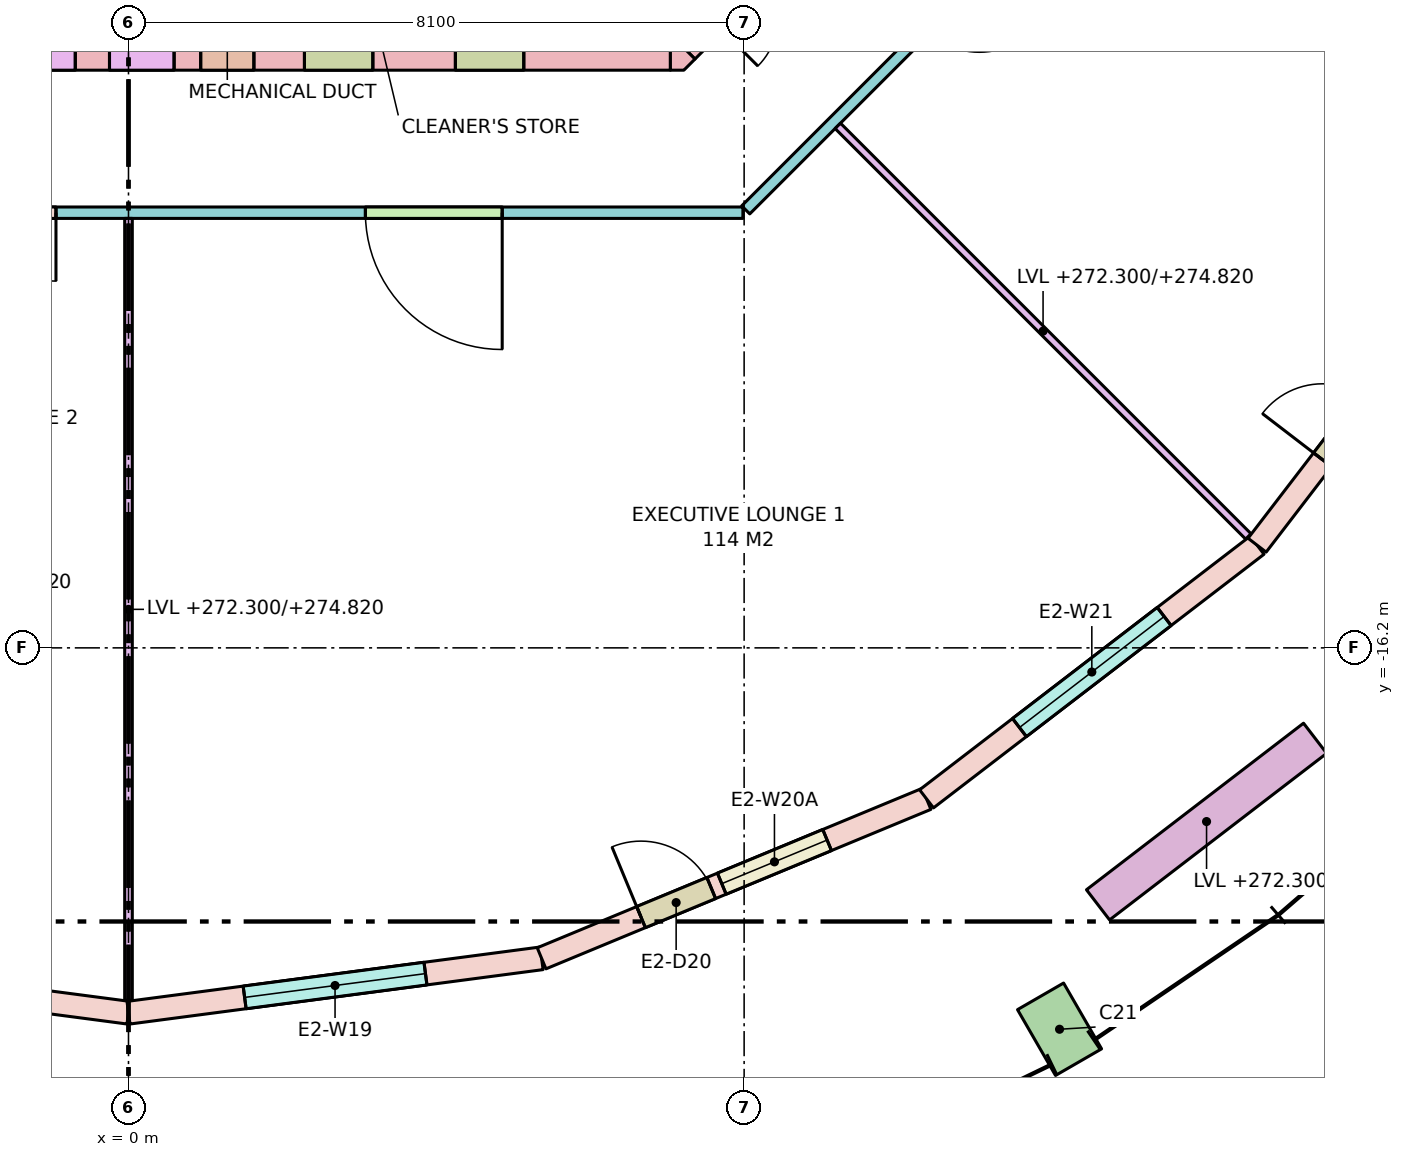
"""IFC4 building model, lengths in metres.
Left out: names, types, materials, properties, quantities, classifications, styles, units other than length and angle.
Written with IfcOpenShell. Run it as: python <this file> out.ifc"""

import sys

from ifc_helpers import new_model, si_unit, direction, frame, frame_2d, origin, origin_2d, place, context, subcontext, project, spatial, polyline, rectangle, outline, extrude, element, fill, save


model = new_model("IFC4")
c1 = context("Model", 3, precision=1e-05, world=origin(), true_north=direction((0.0, 1.0)))
c2 = subcontext(c1, "Body", "Model", "MODEL_VIEW")
j1 = project(units=[si_unit("LENGTHUNIT", "METRE"), si_unit("PLANEANGLEUNIT", "RADIAN")], contexts=[c1])
p1 = place(None, origin())
s1 = spatial("IfcSite", under=j1, at=p1, CompositionType="ELEMENT")
p2 = place(p1, origin())
s2 = spatial("IfcBuilding", under=s1, at=p2, CompositionType="ELEMENT")
p3 = place(p2, frame((0.0, 0.0, 272.3)))
s3 = spatial("IfcBuildingStorey", under=s2, at=p3, CompositionType="ELEMENT", Elevation=272.3)
p4 = place(p3, frame((12.25, -21.218, 0.0), z_axis=(0.0, 0.0, 1.0), x_axis=(0.866025403784, 0.5, 0.0)))
e1 = element("IfcColumn", 1, at=p4, inside=s3, PredefinedType="COLUMN", context=c2, shape_type="SweptSolid", body=[
    extrude(rectangle(XDim=0.7, YDim=1.0, at=origin_2d()), origin(), (0.0, 0.0, 1.0), 3.7),
])
p5 = place(p3, frame((-7.13, -8.35, -0.28), z_axis=(0.0, 0.0, 1.0), x_axis=(1.0, 0.0, 0.0)))
e2 = element("IfcWall", 2, at=p5, inside=s3, PredefinedType="SHEAR", context=c2, shape_type="SweptSolid", body=[
    extrude(rectangle(XDim=14.26, YDim=0.5, at=frame_2d((7.13, 0.0))), origin(), (0.0, 0.0, 1.0), 3.7),
])
p6 = place(p5, frame((8.08, 0.0, 0.28)))
e3 = element("IfcOpeningElement", 3, at=p6, cuts=e2, PredefinedType="OPENING", context=c2, shape_type="SweptSolid", body=[
    extrude(rectangle(XDim=0.7, YDim=2.1, at=frame_2d((0.35, 1.05))), frame((0.0, 0.26, 0.0), z_axis=(0.0, -1.0, 0.0), x_axis=(1.0, 0.0, 0.0)), (0.0, 0.0, 1.0), 0.52),
])
p7 = place(p5, frame((5.58, 0.0, 0.28)))
e4 = element("IfcOpeningElement", 4, at=p7, cuts=e2, PredefinedType="OPENING", context=c2, shape_type="SweptSolid", body=[
    extrude(rectangle(XDim=0.85, YDim=2.1, at=frame_2d((0.425, 1.05))), frame((0.0, 0.26, 0.0), z_axis=(0.0, -1.0, 0.0), x_axis=(1.0, 0.0, 0.0)), (0.0, 0.0, 1.0), 0.52),
])
p8 = place(p5, frame((6.88, 0.0, 0.28)))
e5 = element("IfcOpeningElement", 5, at=p8, cuts=e2, PredefinedType="OPENING", context=c2, shape_type="SweptSolid", body=[
    extrude(rectangle(XDim=0.85, YDim=2.1, at=frame_2d((0.425, 1.05))), frame((0.0, 0.26, 0.0), z_axis=(0.0, -1.0, 0.0), x_axis=(1.0, 0.0, 0.0)), (0.0, 0.0, 1.0), 0.52),
])
p9 = place(p5, frame((9.445, 0.0, 0.28)))
e6 = element("IfcOpeningElement", 6, at=p9, cuts=e2, PredefinedType="OPENING", context=c2, shape_type="SweptSolid", body=[
    extrude(rectangle(XDim=0.9, YDim=2.1, at=frame_2d((0.45, 1.05))), frame((0.0, 0.26, 0.0), z_axis=(0.0, -1.0, 0.0), x_axis=(1.0, 0.0, 0.0)), (0.0, 0.0, 1.0), 0.52),
])
p10 = place(p5, frame((11.431, 0.0, 0.28)))
e7 = element("IfcOpeningElement", 7, at=p10, cuts=e2, PredefinedType="OPENING", context=c2, shape_type="SweptSolid", body=[
    extrude(rectangle(XDim=0.9, YDim=2.1, at=frame_2d((0.45, 1.05))), frame((0.0, 0.26, 0.0), z_axis=(0.0, -1.0, 0.0), x_axis=(1.0, 0.0, 0.0)), (0.0, 0.0, 1.0), 0.52),
])
p11 = place(p3, frame((10.277, -5.277, -0.28), z_axis=(0.0, 0.0, 1.0), x_axis=(-0.707106781187, -0.707106781187, 0.0)))
e8 = element("IfcWall", 8, at=p11, inside=s3, PredefinedType="SHEAR", context=c2, shape_type="SweptSolid", body=[
    extrude(rectangle(XDim=4.243, YDim=0.5, at=frame_2d((2.121, 0.0))), origin(), (0.0, 0.0, 1.0), 3.7),
])
p12 = place(p11, frame((2.823, 0.0, 0.28)))
e9 = element("IfcOpeningElement", 9, at=p12, cuts=e8, PredefinedType="OPENING", context=c2, shape_type="SweptSolid", body=[
    extrude(rectangle(XDim=0.9, YDim=2.1, at=frame_2d((0.45, 1.05))), frame((0.0, 0.26, 0.0), z_axis=(0.0, -1.0, 0.0), x_axis=(1.0, 0.0, 0.0)), (0.0, 0.0, 1.0), 0.52),
])
p13 = place(p11, frame((0.52, 0.0, 0.28)))
e10 = element("IfcOpeningElement", 10, at=p13, cuts=e8, PredefinedType="OPENING", context=c2, shape_type="SweptSolid", body=[
    extrude(rectangle(XDim=0.9, YDim=2.1, at=frame_2d((0.45, 1.05))), frame((0.0, 0.26, 0.0), z_axis=(0.0, -1.0, 0.0), x_axis=(1.0, 0.0, 0.0)), (0.0, 0.0, 1.0), 0.52),
])
p14 = place(p3, frame((0.0, 0.0, -0.28)))
e11 = element("IfcWall", 11, at=p14, inside=s3, PredefinedType="SHEAR", context=c2, shape_type="SweptSolid", body=[
    extrude(outline(polyline([(7.307, -8.6), (7.13, -8.6), (7.13, -8.13), (7.454, -8.454), (7.307, -8.6)])), origin(), (0.0, 0.0, 1.0), 3.7),
])
p15 = place(p3, frame((-5.435, -20.284, 0.0), z_axis=(0.0, 0.0, 1.0), x_axis=(0.991444743541, -0.130527087244, 0.0)))
e12 = element("IfcWall", 12, at=p15, inside=s3, PredefinedType="STANDARD", context=c2, shape_type="SweptSolid", body=[
    extrude(rectangle(XDim=5.482, YDim=0.3, at=frame_2d((2.741, 0.0))), origin(), (0.0, 0.0, 1.0), 3.42),
])
p16 = place(p15, frame((1.416, 0.0, 0.0)))
e13 = element("IfcOpeningElement", 13, at=p16, cuts=e12, PredefinedType="OPENING", context=c2, shape_type="SweptSolid", body=[
    extrude(rectangle(XDim=1.0, YDim=2.4, at=frame_2d((0.5, 1.2))), frame((0.0, 0.16, 0.0), z_axis=(0.0, -1.0, 0.0), x_axis=(1.0, 0.0, 0.0)), (0.0, 0.0, 1.0), 0.32),
])
p17 = place(p15, frame((2.566, 0.0, 0.8)))
e14 = element("IfcOpeningElement", 14, at=p17, cuts=e12, PredefinedType="OPENING", context=c2, shape_type="SweptSolid", body=[
    extrude(rectangle(XDim=1.5, YDim=2.4, at=frame_2d((0.75, 1.2))), frame((0.0, 0.16, 0.0), z_axis=(0.0, -1.0, 0.0), x_axis=(1.0, 0.0, 0.0)), (0.0, 0.0, 1.0), 0.32),
])
p18 = place(p3, frame((0.0, -21.0, 0.0), z_axis=(0.0, 0.0, 1.0), x_axis=(0.991444743541, 0.130527087244, 0.0)))
e15 = element("IfcWall", 15, at=p18, inside=s3, PredefinedType="STANDARD", context=c2, shape_type="SweptSolid", body=[
    extrude(rectangle(XDim=5.482, YDim=0.3, at=frame_2d((2.741, 0.0))), origin(), (0.0, 0.0, 1.0), 3.42),
])
p19 = place(p18, frame((1.541, 0.0, 0.8)))
e16 = element("IfcOpeningElement", 16, at=p19, cuts=e15, PredefinedType="OPENING", context=c2, shape_type="SweptSolid", body=[
    extrude(rectangle(XDim=2.4, YDim=2.4, at=frame_2d((1.2, 1.2))), frame((0.0, 0.16, 0.0), z_axis=(0.0, -1.0, 0.0), x_axis=(1.0, 0.0, 0.0)), (0.0, 0.0, 1.0), 0.32),
])
p20 = place(p3, frame((5.435, -20.284, 0.0), z_axis=(0.0, 0.0, 1.0), x_axis=(0.923877333662, 0.382688740813, 0.0)))
e17 = element("IfcWall", 17, at=p20, inside=s3, PredefinedType="STANDARD", context=c2, shape_type="SweptSolid", body=[
    extrude(rectangle(XDim=5.482, YDim=0.3, at=frame_2d((2.741, 0.0))), origin(), (0.0, 0.0, 1.0), 3.42),
])
p21 = place(p20, frame((1.416, 0.0, 0.0)))
e18 = element("IfcOpeningElement", 18, at=p21, cuts=e17, PredefinedType="OPENING", context=c2, shape_type="SweptSolid", body=[
    extrude(rectangle(XDim=1.0, YDim=2.4, at=frame_2d((0.5, 1.2))), frame((0.0, 0.16, 0.0), z_axis=(0.0, -1.0, 0.0), x_axis=(1.0, 0.0, 0.0)), (0.0, 0.0, 1.0), 0.32),
])
p22 = place(p20, frame((2.566, 0.0, 0.8)))
e19 = element("IfcOpeningElement", 19, at=p22, cuts=e17, PredefinedType="OPENING", context=c2, shape_type="SweptSolid", body=[
    extrude(rectangle(XDim=1.5, YDim=2.4, at=frame_2d((0.75, 1.2))), frame((0.0, 0.16, 0.0), z_axis=(0.0, -1.0, 0.0), x_axis=(1.0, 0.0, 0.0)), (0.0, 0.0, 1.0), 0.32),
])
p23 = place(p3, frame((10.5, -18.187, 0.0), z_axis=(0.0, 0.0, 1.0), x_axis=(0.793335336593, 0.608784891166, 0.0)))
e20 = element("IfcWall", 20, at=p23, inside=s3, PredefinedType="STANDARD", context=c2, shape_type="SweptSolid", body=[
    extrude(rectangle(XDim=5.482, YDim=0.3, at=frame_2d((2.741, 0.0))), origin(), (0.0, 0.0, 1.0), 3.42),
])
p24 = place(p23, frame((1.541, 0.0, 0.8)))
e21 = element("IfcOpeningElement", 21, at=p24, cuts=e20, PredefinedType="OPENING", context=c2, shape_type="SweptSolid", body=[
    extrude(rectangle(XDim=2.4, YDim=2.4, at=frame_2d((1.2, 1.2))), frame((0.0, 0.16, 0.0), z_axis=(0.0, -1.0, 0.0), x_axis=(1.0, 0.0, 0.0)), (0.0, 0.0, 1.0), 0.32),
])
p25 = place(p3, frame((14.849, -14.849, 0.0), z_axis=(0.0, 0.0, 1.0), x_axis=(0.608784891166, 0.793335336593, 0.0)))
e22 = element("IfcWall", 22, at=p25, inside=s3, PredefinedType="STANDARD", context=c2, shape_type="SweptSolid", body=[
    extrude(rectangle(XDim=5.482, YDim=0.3, at=frame_2d((2.741, 0.0))), origin(), (0.0, 0.0, 1.0), 3.42),
])
p26 = place(p25, frame((1.416, 0.0, 0.0)))
e23 = element("IfcOpeningElement", 23, at=p26, cuts=e22, PredefinedType="OPENING", context=c2, shape_type="SweptSolid", body=[
    extrude(rectangle(XDim=1.0, YDim=2.4, at=frame_2d((0.5, 1.2))), frame((0.0, 0.16, 0.0), z_axis=(0.0, -1.0, 0.0), x_axis=(1.0, 0.0, 0.0)), (0.0, 0.0, 1.0), 0.32),
])
p27 = place(p25, frame((2.566, 0.0, 0.8)))
e24 = element("IfcOpeningElement", 24, at=p27, cuts=e22, PredefinedType="OPENING", context=c2, shape_type="SweptSolid", body=[
    extrude(rectangle(XDim=1.5, YDim=2.4, at=frame_2d((0.75, 1.2))), frame((0.0, 0.16, 0.0), z_axis=(0.0, -1.0, 0.0), x_axis=(1.0, 0.0, 0.0)), (0.0, 0.0, 1.0), 0.32),
])
p28 = place(p3, frame((12.756, -19.581, 0.0), z_axis=(0.0, 0.0, 1.0), x_axis=(0.793384730612, 0.608720518162, 0.0)))
e25 = element("IfcWall", 25, at=p28, inside=s3, PredefinedType="PARAPET", context=c2, shape_type="SweptSolid", body=[
    extrude(rectangle(XDim=3.6, YDim=0.5, at=frame_2d((1.8, 0.0))), origin(), (0.0, 0.0, 1.0), 0.9),
])
p29 = place(p3, frame((12.438, -6.121, 0.0), z_axis=(0.0, 0.0, 1.0), x_axis=(-0.707106781187, -0.707106781187, 0.0)))
e26 = element("IfcWall", 26, at=p29, inside=s3, PredefinedType="PARTITIONING", context=c2, shape_type="SweptSolid", body=[
    extrude(rectangle(XDim=6.105, YDim=0.15, at=frame_2d((3.053, 0.0))), origin(), (0.0, 0.0, 1.0), 2.52),
])
p30 = place(p29, frame((1.758, 0.0, 0.0)))
e27 = element("IfcOpeningElement", 27, at=p30, cuts=e26, PredefinedType="OPENING", context=c2, shape_type="SweptSolid", body=[
    extrude(rectangle(XDim=1.0, YDim=2.1, at=frame_2d((0.5, 1.05))), frame((0.0, 0.085, 0.0), z_axis=(0.0, -1.0, 0.0), x_axis=(1.0, 0.0, 0.0)), (0.0, 0.0, 1.0), 0.17),
])
p31 = place(p3, frame((8.084, -10.475, 0.0), z_axis=(0.0, 0.0, 1.0), x_axis=(-1.0, 0.0, 0.0)))
e28 = element("IfcWall", 28, at=p31, inside=s3, PredefinedType="PARTITIONING", context=c2, shape_type="SweptSolid", body=[
    extrude(rectangle(XDim=16.167, YDim=0.15, at=frame_2d((8.084, 0.0))), origin(), (0.0, 0.0, 1.0), 2.52),
])
p32 = place(p31, frame((12.015, 0.0, 0.0)))
e29 = element("IfcOpeningElement", 29, at=p32, cuts=e28, PredefinedType="OPENING", context=c2, shape_type="SweptSolid", body=[
    extrude(rectangle(XDim=1.0, YDim=2.1, at=frame_2d((0.5, 1.05))), frame((0.0, 0.085, 0.0), z_axis=(0.0, -1.0, 0.0), x_axis=(1.0, 0.0, 0.0)), (0.0, 0.0, 1.0), 0.17),
])
p33 = place(p31, frame((9.038, 0.0, 0.0)))
e30 = element("IfcOpeningElement", 30, at=p33, cuts=e28, PredefinedType="OPENING", context=c2, shape_type="SweptSolid", body=[
    extrude(rectangle(XDim=0.9, YDim=2.1, at=frame_2d((0.45, 1.05))), frame((0.0, 0.085, 0.0), z_axis=(0.0, -1.0, 0.0), x_axis=(1.0, 0.0, 0.0)), (0.0, 0.0, 1.0), 0.17),
])
p34 = place(p31, frame((3.167, 0.0, 0.0)))
e31 = element("IfcOpeningElement", 31, at=p34, cuts=e28, PredefinedType="OPENING", context=c2, shape_type="SweptSolid", body=[
    extrude(rectangle(XDim=1.8, YDim=2.1, at=frame_2d((0.9, 1.05))), frame((0.0, 0.085, 0.0), z_axis=(0.0, -1.0, 0.0), x_axis=(1.0, 0.0, 0.0)), (0.0, 0.0, 1.0), 0.17),
])
p35 = place(p3, frame((0.0, -10.55, 0.0), z_axis=(0.0, 0.0, 1.0), x_axis=(0.0, -1.0, 0.0)))
e32 = element("IfcWall", 32, at=p35, inside=s3, PredefinedType="PARTITIONING", context=c2, shape_type="SweptSolid", body=[
    extrude(rectangle(XDim=10.287, YDim=0.1, at=frame_2d((5.143, 0.0))), origin(), (0.0, 0.0, 1.0), 2.52),
])
p36 = place(p3, frame((9.333, -9.333, 0.0), z_axis=(0.0, 0.0, 1.0), x_axis=(0.707106781187, -0.707106781187, 0.0)))
e33 = element("IfcWall", 33, at=p36, inside=s3, PredefinedType="PARTITIONING", context=c2, shape_type="SweptSolid", body=[
    extrude(rectangle(XDim=7.639, YDim=0.1, at=frame_2d((3.819, 0.0))), origin(), (0.0, 0.0, 1.0), 2.52),
])
p37 = place(p19, origin())
e34 = element("IfcWindow", 34, at=p37, inside=s3, PartitioningType="SINGLE_PANEL", PredefinedType="WINDOW", context=c2, shape_type="SweptSolid", body=[
    extrude(rectangle(XDim=2.4, YDim=2.4, at=frame_2d((1.2, 1.2))), frame((0.0, 0.03, 0.0), z_axis=(0.0, -1.0, 0.0), x_axis=(1.0, 0.0, 0.0)), (0.0, 0.0, 1.0), 0.06),
])
fill(e16, e34)
p38 = place(p21, origin())
e35 = element("IfcDoor", 35, at=p38, inside=s3, OperationType="SINGLE_SWING_LEFT", PredefinedType="DOOR", context=c2, shape_type="SweptSolid", body=[
    extrude(rectangle(XDim=1.0, YDim=2.4, at=frame_2d((0.5, 1.2))), frame((0.0, 0.025, 0.0), z_axis=(0.0, -1.0, 0.0), x_axis=(1.0, 0.0, 0.0)), (0.0, 0.0, 1.0), 0.05),
])
fill(e18, e35)
p39 = place(p22, origin())
e36 = element("IfcWindow", 36, at=p39, inside=s3, PartitioningType="SINGLE_PANEL", PredefinedType="WINDOW", context=c2, shape_type="SweptSolid", body=[
    extrude(rectangle(XDim=1.5, YDim=2.4, at=frame_2d((0.75, 1.2))), frame((0.0, 0.03, 0.0), z_axis=(0.0, -1.0, 0.0), x_axis=(1.0, 0.0, 0.0)), (0.0, 0.0, 1.0), 0.06),
])
fill(e19, e36)
p40 = place(p24, origin())
e37 = element("IfcWindow", 37, at=p40, inside=s3, PartitioningType="SINGLE_PANEL", PredefinedType="WINDOW", context=c2, shape_type="SweptSolid", body=[
    extrude(rectangle(XDim=2.4, YDim=2.4, at=frame_2d((1.2, 1.2))), frame((0.0, 0.03, 0.0), z_axis=(0.0, -1.0, 0.0), x_axis=(1.0, 0.0, 0.0)), (0.0, 0.0, 1.0), 0.06),
])
fill(e21, e37)
p41 = place(p26, origin())
e38 = element("IfcDoor", 38, at=p41, inside=s3, OperationType="SINGLE_SWING_LEFT", PredefinedType="DOOR", context=c2, shape_type="SweptSolid", body=[
    extrude(rectangle(XDim=1.0, YDim=2.4, at=frame_2d((0.5, 1.2))), frame((0.0, 0.025, 0.0), z_axis=(0.0, -1.0, 0.0), x_axis=(1.0, 0.0, 0.0)), (0.0, 0.0, 1.0), 0.05),
])
fill(e23, e38)
p42 = place(p6, origin())
e39 = element("IfcDoor", 39, at=p42, inside=s3, OperationType="SINGLE_SWING_RIGHT", PredefinedType="DOOR", context=c2, shape_type="SweptSolid", body=[
    extrude(rectangle(XDim=0.7, YDim=2.1, at=frame_2d((0.35, 1.05))), frame((0.0, 0.025, 0.0), z_axis=(0.0, -1.0, 0.0), x_axis=(1.0, 0.0, 0.0)), (0.0, 0.0, 1.0), 0.05),
])
fill(e3, e39)
p43 = place(p7, origin())
e40 = element("IfcDoor", 40, at=p43, inside=s3, OperationType="SINGLE_SWING_RIGHT", PredefinedType="DOOR", context=c2, shape_type="SweptSolid", body=[
    extrude(rectangle(XDim=0.85, YDim=2.1, at=frame_2d((0.425, 1.05))), frame((0.0, 0.025, 0.0), z_axis=(0.0, -1.0, 0.0), x_axis=(1.0, 0.0, 0.0)), (0.0, 0.0, 1.0), 0.05),
])
fill(e4, e40)
p44 = place(p8, origin())
e41 = element("IfcDoor", 41, at=p44, inside=s3, OperationType="SINGLE_SWING_LEFT", PredefinedType="DOOR", context=c2, shape_type="SweptSolid", body=[
    extrude(rectangle(XDim=0.85, YDim=2.1, at=frame_2d((0.425, 1.05))), frame((0.0, 0.025, 0.0), z_axis=(0.0, -1.0, 0.0), x_axis=(1.0, 0.0, 0.0)), (0.0, 0.0, 1.0), 0.05),
])
fill(e5, e41)
p45 = place(p9, origin())
e42 = element("IfcDoor", 42, at=p45, inside=s3, OperationType="SINGLE_SWING_RIGHT", PredefinedType="DOOR", context=c2, shape_type="SweptSolid", body=[
    extrude(rectangle(XDim=0.9, YDim=2.1, at=frame_2d((0.45, 1.05))), frame((0.0, 0.025, 0.0), z_axis=(0.0, -1.0, 0.0), x_axis=(1.0, 0.0, 0.0)), (0.0, 0.0, 1.0), 0.05),
])
fill(e6, e42)
p46 = place(p10, origin())
e43 = element("IfcDoor", 43, at=p46, inside=s3, OperationType="SINGLE_SWING_LEFT", PredefinedType="DOOR", context=c2, shape_type="SweptSolid", body=[
    extrude(rectangle(XDim=0.9, YDim=2.1, at=frame_2d((0.45, 1.05))), frame((0.0, 0.025, 0.0), z_axis=(0.0, -1.0, 0.0), x_axis=(1.0, 0.0, 0.0)), (0.0, 0.0, 1.0), 0.05),
])
fill(e7, e43)
p47 = place(p33, origin())
e44 = element("IfcDoor", 44, at=p47, inside=s3, OperationType="SINGLE_SWING_LEFT", PredefinedType="DOOR", context=c2, shape_type="SweptSolid", body=[
    extrude(rectangle(XDim=0.9, YDim=2.1, at=frame_2d((0.45, 1.05))), frame((0.0, 0.025, 0.0), z_axis=(0.0, -1.0, 0.0), x_axis=(1.0, 0.0, 0.0)), (0.0, 0.0, 1.0), 0.05),
])
fill(e30, e44)
p48 = place(p34, origin())
e45 = element("IfcDoor", 45, at=p48, inside=s3, OperationType="DOUBLE_DOOR_SINGLE_SWING", PredefinedType="DOOR", context=c2, shape_type="SweptSolid", body=[
    extrude(rectangle(XDim=1.8, YDim=2.1, at=frame_2d((0.9, 1.05))), frame((0.0, 0.025, 0.0), z_axis=(0.0, -1.0, 0.0), x_axis=(1.0, 0.0, 0.0)), (0.0, 0.0, 1.0), 0.05),
])
fill(e31, e45)
save(model, sys.argv[1])
